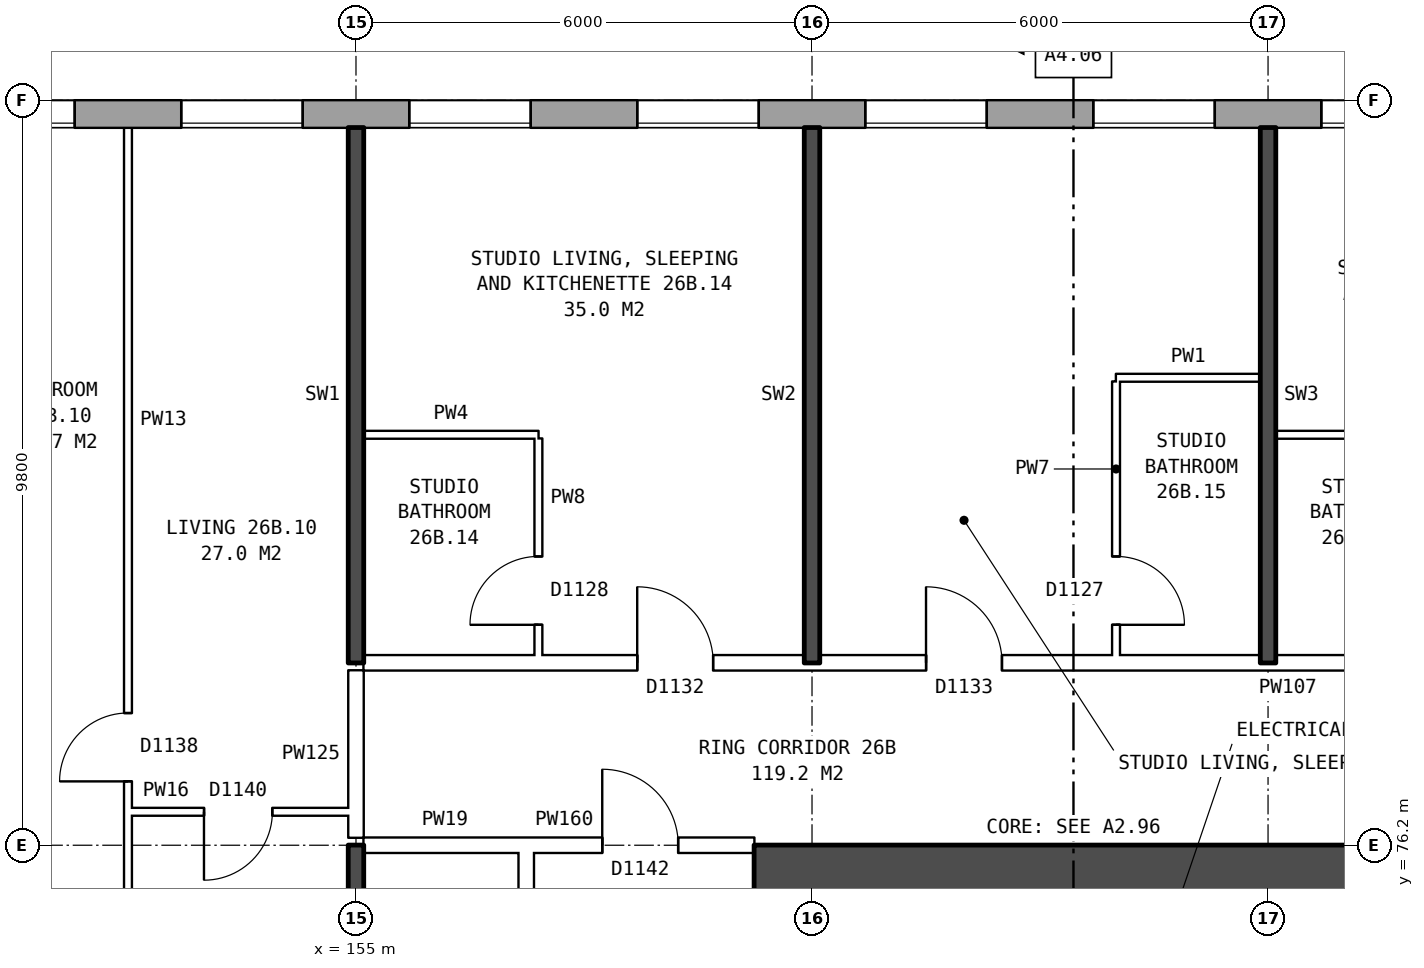
"""IFC4 building model, lengths in metres.
Left out: names, types, materials, properties, quantities, classifications, styles, units other than length and angle.
Written with IfcOpenShell. Run it as: python <this file> out.ifc"""

import sys

from ifc_helpers import new_model, si_unit, direction, frame, frame_2d, origin, place, context, subcontext, project, spatial, rectangle, extrude, element, fill, save


model = new_model("IFC4")
c1 = context("Model", 3, precision=1e-05, world=origin(), true_north=direction((0.0, 1.0)))
c2 = subcontext(c1, "Body", "Model", "MODEL_VIEW")
j1 = project(units=[si_unit("LENGTHUNIT", "METRE"), si_unit("PLANEANGLEUNIT", "RADIAN")], contexts=[c1])
p1 = place(None, origin())
s1 = spatial("IfcSite", under=j1, at=p1, CompositionType="ELEMENT")
p2 = place(p1, origin())
s2 = spatial("IfcBuilding", under=s1, at=p2, CompositionType="ELEMENT")
p3 = place(p2, frame((0.0, 0.0, 96.4)))
s3 = spatial("IfcBuildingStorey", under=s2, at=p3, CompositionType="ELEMENT", Elevation=96.4)
p4 = place(p3, frame((170.925, 85.82, 0.0), z_axis=(0.0, 0.0, 1.0), x_axis=(-1.0, 0.0, 0.0)))
e1 = element("IfcWall", 1, at=p4, inside=s3, PredefinedType="STANDARD", context=c2, shape_type="SweptSolid", body=[
    extrude(rectangle(XDim=36.851, YDim=0.36, at=frame_2d((18.425, 0.0))), origin(), (0.0, 0.0, 1.0), 2.85),
])
p5 = place(p4, frame((1.625, 0.0, 0.8)))
e2 = element("IfcOpeningElement", 2, at=p5, cuts=e1, PredefinedType="OPENING", context=c2, shape_type="SweptSolid", body=[
    extrude(rectangle(XDim=1.6, YDim=1.8, at=frame_2d((0.8, 0.9))), frame((0.0, 0.19, 0.0), z_axis=(0.0, -1.0, 0.0), x_axis=(1.0, 0.0, 0.0)), (0.0, 0.0, 1.0), 0.38),
])
p6 = place(p4, frame((4.625, 0.0, 0.8)))
e3 = element("IfcOpeningElement", 3, at=p6, cuts=e1, PredefinedType="OPENING", context=c2, shape_type="SweptSolid", body=[
    extrude(rectangle(XDim=1.6, YDim=1.8, at=frame_2d((0.8, 0.9))), frame((0.0, 0.19, 0.0), z_axis=(0.0, -1.0, 0.0), x_axis=(1.0, 0.0, 0.0)), (0.0, 0.0, 1.0), 0.38),
])
p7 = place(p4, frame((7.625, 0.0, 0.8)))
e4 = element("IfcOpeningElement", 4, at=p7, cuts=e1, PredefinedType="OPENING", context=c2, shape_type="SweptSolid", body=[
    extrude(rectangle(XDim=1.6, YDim=1.8, at=frame_2d((0.8, 0.9))), frame((0.0, 0.19, 0.0), z_axis=(0.0, -1.0, 0.0), x_axis=(1.0, 0.0, 0.0)), (0.0, 0.0, 1.0), 0.38),
])
p8 = place(p4, frame((10.625, 0.0, 0.8)))
e5 = element("IfcOpeningElement", 5, at=p8, cuts=e1, PredefinedType="OPENING", context=c2, shape_type="SweptSolid", body=[
    extrude(rectangle(XDim=1.6, YDim=1.8, at=frame_2d((0.8, 0.9))), frame((0.0, 0.19, 0.0), z_axis=(0.0, -1.0, 0.0), x_axis=(1.0, 0.0, 0.0)), (0.0, 0.0, 1.0), 0.38),
])
p9 = place(p4, frame((13.625, 0.0, 0.8)))
e6 = element("IfcOpeningElement", 6, at=p9, cuts=e1, PredefinedType="OPENING", context=c2, shape_type="SweptSolid", body=[
    extrude(rectangle(XDim=1.6, YDim=1.8, at=frame_2d((0.8, 0.9))), frame((0.0, 0.19, 0.0), z_axis=(0.0, -1.0, 0.0), x_axis=(1.0, 0.0, 0.0)), (0.0, 0.0, 1.0), 0.38),
])
p10 = place(p4, frame((16.625, 0.0, 0.8)))
e7 = element("IfcOpeningElement", 7, at=p10, cuts=e1, PredefinedType="OPENING", context=c2, shape_type="SweptSolid", body=[
    extrude(rectangle(XDim=1.6, YDim=1.8, at=frame_2d((0.8, 0.9))), frame((0.0, 0.19, 0.0), z_axis=(0.0, -1.0, 0.0), x_axis=(1.0, 0.0, 0.0)), (0.0, 0.0, 1.0), 0.38),
])
p11 = place(p4, frame((19.625, 0.0, 0.8)))
e8 = element("IfcOpeningElement", 8, at=p11, cuts=e1, PredefinedType="OPENING", context=c2, shape_type="SweptSolid", body=[
    extrude(rectangle(XDim=1.6, YDim=1.8, at=frame_2d((0.8, 0.9))), frame((0.0, 0.19, 0.0), z_axis=(0.0, -1.0, 0.0), x_axis=(1.0, 0.0, 0.0)), (0.0, 0.0, 1.0), 0.38),
])
p12 = place(p4, frame((22.625, 0.0, 0.8)))
e9 = element("IfcOpeningElement", 9, at=p12, cuts=e1, PredefinedType="OPENING", context=c2, shape_type="SweptSolid", body=[
    extrude(rectangle(XDim=1.6, YDim=1.8, at=frame_2d((0.8, 0.9))), frame((0.0, 0.19, 0.0), z_axis=(0.0, -1.0, 0.0), x_axis=(1.0, 0.0, 0.0)), (0.0, 0.0, 1.0), 0.38),
])
p13 = place(p4, frame((25.625, 0.0, 0.8)))
e10 = element("IfcOpeningElement", 10, at=p13, cuts=e1, PredefinedType="OPENING", context=c2, shape_type="SweptSolid", body=[
    extrude(rectangle(XDim=1.6, YDim=1.8, at=frame_2d((0.8, 0.9))), frame((0.0, 0.19, 0.0), z_axis=(0.0, -1.0, 0.0), x_axis=(1.0, 0.0, 0.0)), (0.0, 0.0, 1.0), 0.38),
])
p14 = place(p4, frame((28.625, 0.0, 0.8)))
e11 = element("IfcOpeningElement", 11, at=p14, cuts=e1, PredefinedType="OPENING", context=c2, shape_type="SweptSolid", body=[
    extrude(rectangle(XDim=1.6, YDim=1.8, at=frame_2d((0.8, 0.9))), frame((0.0, 0.19, 0.0), z_axis=(0.0, -1.0, 0.0), x_axis=(1.0, 0.0, 0.0)), (0.0, 0.0, 1.0), 0.38),
])
p15 = place(p4, frame((31.625, 0.0, 0.8)))
e12 = element("IfcOpeningElement", 12, at=p15, cuts=e1, PredefinedType="OPENING", context=c2, shape_type="SweptSolid", body=[
    extrude(rectangle(XDim=1.6, YDim=1.8, at=frame_2d((0.8, 0.9))), frame((0.0, 0.19, 0.0), z_axis=(0.0, -1.0, 0.0), x_axis=(1.0, 0.0, 0.0)), (0.0, 0.0, 1.0), 0.38),
])
p16 = place(p4, frame((34.125, 0.0, 0.8)))
e13 = element("IfcOpeningElement", 13, at=p16, cuts=e1, PredefinedType="OPENING", context=c2, shape_type="SweptSolid", body=[
    extrude(rectangle(XDim=1.4, YDim=1.8, at=frame_2d((0.7, 0.9))), frame((0.0, 0.19, 0.0), z_axis=(0.0, -1.0, 0.0), x_axis=(1.0, 0.0, 0.0)), (0.0, 0.0, 1.0), 0.38),
])
p17 = place(p4, frame((35.825, 0.0, 0.8)))
e14 = element("IfcOpeningElement", 14, at=p17, cuts=e1, PredefinedType="OPENING", context=c2, shape_type="SweptSolid", body=[
    extrude(rectangle(XDim=0.6, YDim=1.2, at=frame_2d((0.3, 0.6))), frame((0.0, 0.19, 0.0), z_axis=(0.0, -1.0, 0.0), x_axis=(1.0, 0.0, 0.0)), (0.0, 0.0, 1.0), 0.38),
])
p18 = place(p3, frame((160.24, 75.875, 0.0), z_axis=(0.0, 0.0, 1.0), x_axis=(1.0, 0.0, 0.0)))
e15 = element("IfcWall", 15, at=p18, inside=s3, PredefinedType="SHEAR", context=c2, shape_type="SweptSolid", body=[
    extrude(rectangle(XDim=8.4, YDim=0.65, at=frame_2d((4.2, 0.0))), origin(), (0.0, 0.0, 1.0), 2.85),
])
p19 = place(p3, frame((157.24, 63.9, 0.0), z_axis=(0.0, 0.0, 1.0), x_axis=(0.0, 1.0, 0.0)))
e16 = element("IfcWall", 16, at=p19, inside=s3, PredefinedType="PARTITIONING", context=c2, shape_type="SweptSolid", body=[
    extrude(rectangle(XDim=12.2, YDim=0.2, at=frame_2d((6.1, 0.0))), origin(), (0.0, 0.0, 1.0), 2.85),
])
p20 = place(p19, frame((5.1, 0.0, 0.0)))
e17 = element("IfcOpeningElement", 17, at=p20, cuts=e16, PredefinedType="OPENING", context=c2, shape_type="SweptSolid", body=[
    extrude(rectangle(XDim=2.0, YDim=2.1, at=frame_2d((1.0, 1.05))), frame((0.0, 0.11, 0.0), z_axis=(0.0, -1.0, 0.0), x_axis=(1.0, 0.0, 0.0)), (0.0, 0.0, 1.0), 0.22),
])
p21 = place(p3, frame((155.1, 76.2, 0.0), z_axis=(0.0, 0.0, 1.0), x_axis=(1.0, 0.0, 0.0)))
e18 = element("IfcWall", 18, at=p21, inside=s3, PredefinedType="PARTITIONING", context=c2, shape_type="SweptSolid", body=[
    extrude(rectangle(XDim=2.14, YDim=0.2, at=frame_2d((1.07, 0.0))), origin(), (0.0, 0.0, 1.0), 2.85),
])
p22 = place(p3, frame((157.24, 76.2, 0.0), z_axis=(0.0, 0.0, 1.0), x_axis=(1.0, 0.0, 0.0)))
e19 = element("IfcWall", 19, at=p22, inside=s3, PredefinedType="PARTITIONING", context=c2, shape_type="SweptSolid", body=[
    extrude(rectangle(XDim=3.0, YDim=0.2, at=frame_2d((1.5, 0.0))), origin(), (0.0, 0.0, 1.0), 2.85),
])
p23 = place(p22, frame((1.0, 0.0, 0.0)))
e20 = element("IfcOpeningElement", 20, at=p23, cuts=e19, PredefinedType="OPENING", context=c2, shape_type="SweptSolid", body=[
    extrude(rectangle(XDim=1.0, YDim=2.1, at=frame_2d((0.5, 1.05))), frame((0.0, 0.11, 0.0), z_axis=(0.0, -1.0, 0.0), x_axis=(1.0, 0.0, 0.0)), (0.0, 0.0, 1.0), 0.22),
])
p24 = place(p3, frame((152.0, 76.64, 0.0), z_axis=(0.0, 0.0, 1.0), x_axis=(1.0, 0.0, 0.0)))
e21 = element("IfcWall", 21, at=p24, inside=s3, PredefinedType="PARTITIONING", context=c2, shape_type="SweptSolid", body=[
    extrude(rectangle(XDim=2.9, YDim=0.1, at=frame_2d((1.45, 0.0))), origin(), (0.0, 0.0, 1.0), 2.85),
])
p25 = place(p24, frame((1.0, 0.0, 0.0)))
e22 = element("IfcOpeningElement", 22, at=p25, cuts=e21, PredefinedType="OPENING", context=c2, shape_type="SweptSolid", body=[
    extrude(rectangle(XDim=0.9, YDim=2.1, at=frame_2d((0.45, 1.05))), frame((0.0, 0.06, 0.0), z_axis=(0.0, -1.0, 0.0), x_axis=(1.0, 0.0, 0.0)), (0.0, 0.0, 1.0), 0.12),
])
p26 = place(p3, frame((155.1, 78.6, 0.0), z_axis=(0.0, 0.0, 1.0), x_axis=(1.0, 0.0, 0.0)))
e23 = element("IfcWall", 23, at=p26, inside=s3, PredefinedType="PARTITIONING", context=c2, shape_type="SweptSolid", body=[
    extrude(rectangle(XDim=18.54, YDim=0.2, at=frame_2d((9.27, 0.0))), origin(), (0.0, 0.0, 1.0), 2.85),
])
p27 = place(p26, frame((3.6, 0.0, 0.0)))
e24 = element("IfcOpeningElement", 24, at=p27, cuts=e23, PredefinedType="OPENING", context=c2, shape_type="SweptSolid", body=[
    extrude(rectangle(XDim=1.0, YDim=2.1, at=frame_2d((0.5, 1.05))), frame((0.0, 0.11, 0.0), z_axis=(0.0, -1.0, 0.0), x_axis=(1.0, 0.0, 0.0)), (0.0, 0.0, 1.0), 0.22),
])
p28 = place(p26, frame((7.4, 0.0, 0.0)))
e25 = element("IfcOpeningElement", 25, at=p28, cuts=e23, PredefinedType="OPENING", context=c2, shape_type="SweptSolid", body=[
    extrude(rectangle(XDim=1.0, YDim=2.1, at=frame_2d((0.5, 1.05))), frame((0.0, 0.11, 0.0), z_axis=(0.0, -1.0, 0.0), x_axis=(1.0, 0.0, 0.0)), (0.0, 0.0, 1.0), 0.22),
])
p29 = place(p26, frame((15.92, 0.0, 0.0)))
e26 = element("IfcOpeningElement", 26, at=p29, cuts=e23, PredefinedType="OPENING", context=c2, shape_type="SweptSolid", body=[
    extrude(rectangle(XDim=1.0, YDim=2.1, at=frame_2d((0.5, 1.05))), frame((0.0, 0.11, 0.0), z_axis=(0.0, -1.0, 0.0), x_axis=(1.0, 0.0, 0.0)), (0.0, 0.0, 1.0), 0.22),
])
for number, where, z_axis, x_axis in (
    (27, (155.1, 81.6, 0.0), (0.0, 0.0, 1.0), (1.0, 0.0, 0.0)),
    (28, (167.1, 81.6, 0.0), (0.0, 0.0, 1.0), (1.0, 0.0, 0.0)),
):
    element("IfcWall", number, at=place(p3, frame(where, z_axis=z_axis, x_axis=x_axis)), inside=s3, PredefinedType="PARTITIONING", context=c2, shape_type="SweptSolid", body=[
        extrude(rectangle(XDim=2.3, YDim=0.1, at=frame_2d((1.15, 0.0))), origin(), (0.0, 0.0, 1.0), 2.85),
    ])
p30 = place(p3, frame((165.0, 82.35, 0.0), z_axis=(0.0, 0.0, 1.0), x_axis=(1.0, 0.0, 0.0)))
e29 = element("IfcWall", 29, at=p30, inside=s3, PredefinedType="PARTITIONING", context=c2, shape_type="SweptSolid", body=[
    extrude(rectangle(XDim=1.9, YDim=0.1, at=frame_2d((0.95, 0.0))), origin(), (0.0, 0.0, 1.0), 2.85),
])
p31 = place(p3, frame((152.0, 71.3, 0.0), z_axis=(0.0, 0.0, 1.0), x_axis=(0.0, 1.0, 0.0)))
e30 = element("IfcWall", 30, at=p31, inside=s3, PredefinedType="PARTITIONING", context=c2, shape_type="SweptSolid", body=[
    extrude(rectangle(XDim=14.34, YDim=0.1, at=frame_2d((7.17, 0.0))), origin(), (0.0, 0.0, 1.0), 2.85),
])
p32 = place(p31, frame((5.74, 0.0, 0.0)))
e31 = element("IfcOpeningElement", 31, at=p32, cuts=e30, PredefinedType="OPENING", context=c2, shape_type="SweptSolid", body=[
    extrude(rectangle(XDim=0.9, YDim=2.1, at=frame_2d((0.45, 1.05))), frame((0.0, 0.06, 0.0), z_axis=(0.0, -1.0, 0.0), x_axis=(1.0, 0.0, 0.0)), (0.0, 0.0, 1.0), 0.12),
])
p33 = place(p31, frame((0.4, 0.0, 0.0)))
e32 = element("IfcOpeningElement", 32, at=p33, cuts=e30, PredefinedType="OPENING", context=c2, shape_type="SweptSolid", body=[
    extrude(rectangle(XDim=0.9, YDim=2.1, at=frame_2d((0.45, 1.05))), frame((0.0, 0.06, 0.0), z_axis=(0.0, -1.0, 0.0), x_axis=(1.0, 0.0, 0.0)), (0.0, 0.0, 1.0), 0.12),
])
p34 = place(p3, frame((155.0, 71.2, 0.0), z_axis=(0.0, 0.0, 1.0), x_axis=(0.0, 1.0, 0.0)))
e33 = element("IfcWall", 33, at=p34, inside=s3, PredefinedType="SOLIDWALL", context=c2, shape_type="SweptSolid", body=[
    extrude(rectangle(XDim=5.0, YDim=0.2, at=frame_2d((2.5, 0.0))), origin(), (0.0, 0.0, 1.0), 2.85),
])
p35 = place(p3, frame((155.0, 76.3, 0.0), z_axis=(0.0, 0.0, 1.0), x_axis=(0.0, 1.0, 0.0)))
e34 = element("IfcWall", 34, at=p35, inside=s3, PredefinedType="PARTITIONING", context=c2, shape_type="SweptSolid", body=[
    extrude(rectangle(XDim=2.2, YDim=0.2, at=frame_2d((1.1, 0.0))), origin(), (0.0, 0.0, 1.0), 2.85),
])
p36 = place(p3, frame((155.0, 78.6, 0.0), z_axis=(0.0, 0.0, 1.0), x_axis=(0.0, 1.0, 0.0)))
e35 = element("IfcWall", 35, at=p36, inside=s3, PredefinedType="SOLIDWALL", context=c2, shape_type="SweptSolid", body=[
    extrude(rectangle(XDim=7.04, YDim=0.2, at=frame_2d((3.52, 0.0))), origin(), (0.0, 0.0, 1.0), 2.85),
])
p37 = place(p3, frame((157.4, 78.7, 0.0), z_axis=(0.0, 0.0, 1.0), x_axis=(0.0, 1.0, 0.0)))
e36 = element("IfcWall", 36, at=p37, inside=s3, PredefinedType="PARTITIONING", context=c2, shape_type="SweptSolid", body=[
    extrude(rectangle(XDim=2.85, YDim=0.1, at=frame_2d((1.425, 0.0))), origin(), (0.0, 0.0, 1.0), 2.85),
])
p38 = place(p37, frame((0.4, 0.0, 0.0)))
e37 = element("IfcOpeningElement", 37, at=p38, cuts=e36, PredefinedType="OPENING", context=c2, shape_type="SweptSolid", body=[
    extrude(rectangle(XDim=0.9, YDim=2.1, at=frame_2d((0.45, 1.05))), frame((0.0, 0.06, 0.0), z_axis=(0.0, -1.0, 0.0), x_axis=(1.0, 0.0, 0.0)), (0.0, 0.0, 1.0), 0.12),
])
p39 = place(p3, frame((161.0, 78.6, 0.0), z_axis=(0.0, 0.0, 1.0), x_axis=(0.0, 1.0, 0.0)))
e38 = element("IfcWall", 38, at=p39, inside=s3, PredefinedType="SOLIDWALL", context=c2, shape_type="SweptSolid", body=[
    extrude(rectangle(XDim=7.04, YDim=0.2, at=frame_2d((3.52, 0.0))), origin(), (0.0, 0.0, 1.0), 2.85),
])
p40 = place(p3, frame((165.0, 78.7, 0.0), z_axis=(0.0, 0.0, 1.0), x_axis=(0.0, 1.0, 0.0)))
e39 = element("IfcWall", 39, at=p40, inside=s3, PredefinedType="PARTITIONING", context=c2, shape_type="SweptSolid", body=[
    extrude(rectangle(XDim=3.6, YDim=0.1, at=frame_2d((1.8, 0.0))), origin(), (0.0, 0.0, 1.0), 2.85),
])
p41 = place(p40, frame((0.4, 0.0, 0.0)))
e40 = element("IfcOpeningElement", 40, at=p41, cuts=e39, PredefinedType="OPENING", context=c2, shape_type="SweptSolid", body=[
    extrude(rectangle(XDim=0.9, YDim=2.1, at=frame_2d((0.45, 1.05))), frame((0.0, 0.06, 0.0), z_axis=(0.0, -1.0, 0.0), x_axis=(1.0, 0.0, 0.0)), (0.0, 0.0, 1.0), 0.12),
])
p42 = place(p3, frame((167.0, 78.6, 0.0), z_axis=(0.0, 0.0, 1.0), x_axis=(0.0, 1.0, 0.0)))
e41 = element("IfcWall", 41, at=p42, inside=s3, PredefinedType="SOLIDWALL", context=c2, shape_type="SweptSolid", body=[
    extrude(rectangle(XDim=7.04, YDim=0.2, at=frame_2d((3.52, 0.0))), origin(), (0.0, 0.0, 1.0), 2.85),
])
p43 = place(p5, origin())
e42 = element("IfcWindow", 42, at=p43, inside=s3, PartitioningType="SINGLE_PANEL", PredefinedType="WINDOW", context=c2, shape_type="SweptSolid", body=[
    extrude(rectangle(XDim=1.6, YDim=1.8, at=frame_2d((0.8, 0.9))), frame((0.0, 0.15, 0.0), z_axis=(0.0, -1.0, 0.0), x_axis=(1.0, 0.0, 0.0)), (0.0, 0.0, 1.0), 0.06),
])
fill(e2, e42)
p44 = place(p6, origin())
e43 = element("IfcWindow", 43, at=p44, inside=s3, PartitioningType="SINGLE_PANEL", PredefinedType="WINDOW", context=c2, shape_type="SweptSolid", body=[
    extrude(rectangle(XDim=1.6, YDim=1.8, at=frame_2d((0.8, 0.9))), frame((0.0, 0.15, 0.0), z_axis=(0.0, -1.0, 0.0), x_axis=(1.0, 0.0, 0.0)), (0.0, 0.0, 1.0), 0.06),
])
fill(e3, e43)
p45 = place(p7, origin())
e44 = element("IfcWindow", 44, at=p45, inside=s3, PartitioningType="SINGLE_PANEL", PredefinedType="WINDOW", context=c2, shape_type="SweptSolid", body=[
    extrude(rectangle(XDim=1.6, YDim=1.8, at=frame_2d((0.8, 0.9))), frame((0.0, 0.15, 0.0), z_axis=(0.0, -1.0, 0.0), x_axis=(1.0, 0.0, 0.0)), (0.0, 0.0, 1.0), 0.06),
])
fill(e4, e44)
p46 = place(p8, origin())
e45 = element("IfcWindow", 45, at=p46, inside=s3, PartitioningType="SINGLE_PANEL", PredefinedType="WINDOW", context=c2, shape_type="SweptSolid", body=[
    extrude(rectangle(XDim=1.6, YDim=1.8, at=frame_2d((0.8, 0.9))), frame((0.0, 0.15, 0.0), z_axis=(0.0, -1.0, 0.0), x_axis=(1.0, 0.0, 0.0)), (0.0, 0.0, 1.0), 0.06),
])
fill(e5, e45)
p47 = place(p9, origin())
e46 = element("IfcWindow", 46, at=p47, inside=s3, PartitioningType="SINGLE_PANEL", PredefinedType="WINDOW", context=c2, shape_type="SweptSolid", body=[
    extrude(rectangle(XDim=1.6, YDim=1.8, at=frame_2d((0.8, 0.9))), frame((0.0, 0.15, 0.0), z_axis=(0.0, -1.0, 0.0), x_axis=(1.0, 0.0, 0.0)), (0.0, 0.0, 1.0), 0.06),
])
fill(e6, e46)
p48 = place(p10, origin())
e47 = element("IfcWindow", 47, at=p48, inside=s3, PartitioningType="SINGLE_PANEL", PredefinedType="WINDOW", context=c2, shape_type="SweptSolid", body=[
    extrude(rectangle(XDim=1.6, YDim=1.8, at=frame_2d((0.8, 0.9))), frame((0.0, 0.15, 0.0), z_axis=(0.0, -1.0, 0.0), x_axis=(1.0, 0.0, 0.0)), (0.0, 0.0, 1.0), 0.06),
])
fill(e7, e47)
p49 = place(p11, origin())
e48 = element("IfcWindow", 48, at=p49, inside=s3, PartitioningType="SINGLE_PANEL", PredefinedType="WINDOW", context=c2, shape_type="SweptSolid", body=[
    extrude(rectangle(XDim=1.6, YDim=1.8, at=frame_2d((0.8, 0.9))), frame((0.0, 0.15, 0.0), z_axis=(0.0, -1.0, 0.0), x_axis=(1.0, 0.0, 0.0)), (0.0, 0.0, 1.0), 0.06),
])
fill(e8, e48)
p50 = place(p23, origin())
e49 = element("IfcDoor", 49, at=p50, inside=s3, OperationType="SINGLE_SWING_LEFT", PredefinedType="DOOR", context=c2, shape_type="SweptSolid", body=[
    extrude(rectangle(XDim=1.0, YDim=2.1, at=frame_2d((0.5, 1.05))), frame((0.0, 0.025, 0.0), z_axis=(0.0, -1.0, 0.0), x_axis=(1.0, 0.0, 0.0)), (0.0, 0.0, 1.0), 0.05),
])
fill(e20, e49)
p51 = place(p32, origin())
e50 = element("IfcDoor", 50, at=p51, inside=s3, OperationType="SINGLE_SWING_LEFT", PredefinedType="DOOR", context=c2, shape_type="SweptSolid", body=[
    extrude(rectangle(XDim=0.9, YDim=2.1, at=frame_2d((0.45, 1.05))), frame((0.0, 0.025, 0.0), z_axis=(0.0, -1.0, 0.0), x_axis=(1.0, 0.0, 0.0)), (0.0, 0.0, 1.0), 0.05),
])
fill(e31, e50)
p52 = place(p25, frame((0.9, 0.0, 0.0), z_axis=(0.0, 0.0, 1.0), x_axis=(-1.0, 0.0, 0.0)))
e51 = element("IfcDoor", 51, at=p52, inside=s3, OperationType="SINGLE_SWING_RIGHT", PredefinedType="DOOR", context=c2, shape_type="SweptSolid", body=[
    extrude(rectangle(XDim=0.9, YDim=2.1, at=frame_2d((0.45, 1.05))), frame((0.0, 0.025, 0.0), z_axis=(0.0, -1.0, 0.0), x_axis=(1.0, 0.0, 0.0)), (0.0, 0.0, 1.0), 0.05),
])
fill(e22, e51)
p53 = place(p27, origin())
e52 = element("IfcDoor", 52, at=p53, inside=s3, OperationType="SINGLE_SWING_LEFT", PredefinedType="DOOR", context=c2, shape_type="SweptSolid", body=[
    extrude(rectangle(XDim=1.0, YDim=2.1, at=frame_2d((0.5, 1.05))), frame((0.0, 0.025, 0.0), z_axis=(0.0, -1.0, 0.0), x_axis=(1.0, 0.0, 0.0)), (0.0, 0.0, 1.0), 0.05),
])
fill(e24, e52)
p54 = place(p38, origin())
e53 = element("IfcDoor", 53, at=p54, inside=s3, OperationType="SINGLE_SWING_LEFT", PredefinedType="DOOR", context=c2, shape_type="SweptSolid", body=[
    extrude(rectangle(XDim=0.9, YDim=2.1, at=frame_2d((0.45, 1.05))), frame((0.0, 0.025, 0.0), z_axis=(0.0, -1.0, 0.0), x_axis=(1.0, 0.0, 0.0)), (0.0, 0.0, 1.0), 0.05),
])
fill(e37, e53)
p55 = place(p28, origin())
e54 = element("IfcDoor", 54, at=p55, inside=s3, OperationType="SINGLE_SWING_LEFT", PredefinedType="DOOR", context=c2, shape_type="SweptSolid", body=[
    extrude(rectangle(XDim=1.0, YDim=2.1, at=frame_2d((0.5, 1.05))), frame((0.0, 0.025, 0.0), z_axis=(0.0, -1.0, 0.0), x_axis=(1.0, 0.0, 0.0)), (0.0, 0.0, 1.0), 0.05),
])
fill(e25, e54)
p56 = place(p41, frame((0.9, 0.0, 0.0), z_axis=(0.0, 0.0, 1.0), x_axis=(-1.0, 0.0, 0.0)))
e55 = element("IfcDoor", 55, at=p56, inside=s3, OperationType="SINGLE_SWING_RIGHT", PredefinedType="DOOR", context=c2, shape_type="SweptSolid", body=[
    extrude(rectangle(XDim=0.9, YDim=2.1, at=frame_2d((0.45, 1.05))), frame((0.0, 0.025, 0.0), z_axis=(0.0, -1.0, 0.0), x_axis=(1.0, 0.0, 0.0)), (0.0, 0.0, 1.0), 0.05),
])
fill(e40, e55)
save(model, sys.argv[1])
